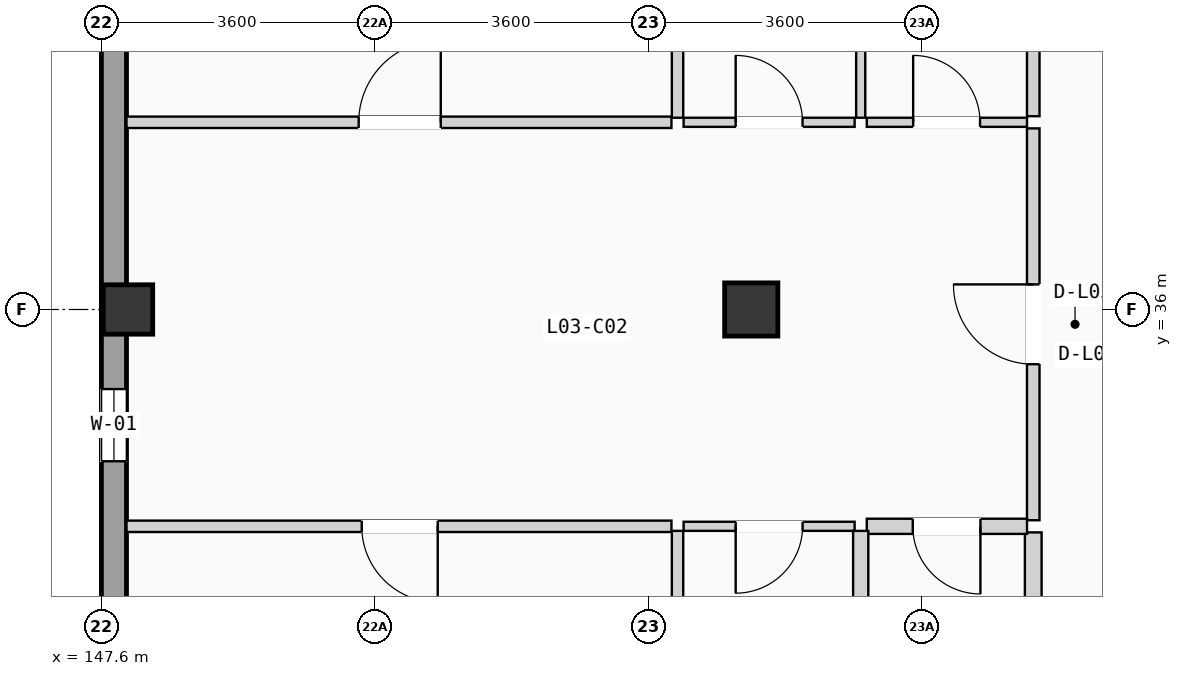
"""IFC4 building model, lengths in metres.
Left out: names, types, materials, properties, quantities, classifications, styles, units other than length and angle.
Written with IfcOpenShell. Run it as: python <this file> out.ifc"""

import sys

from ifc_helpers import new_model, si_unit, direction, frame, frame_2d, origin, origin_2d, place, context, subcontext, project, spatial, rectangle, extrude, element, fill, save


model = new_model("IFC4")
c1 = context("Model", 3, precision=1e-05, world=origin(), true_north=direction((0.0, 1.0)))
c2 = subcontext(c1, "Body", "Model", "MODEL_VIEW")
j1 = project(units=[si_unit("LENGTHUNIT", "METRE"), si_unit("PLANEANGLEUNIT", "RADIAN")], contexts=[c1])
p1 = place(None, origin())
s1 = spatial("IfcSite", under=j1, at=p1, CompositionType="ELEMENT")
p2 = place(p1, origin())
s2 = spatial("IfcBuilding", under=s1, at=p2, CompositionType="ELEMENT")
p3 = place(p2, frame((0.0, 0.0, 12.075)))
s3 = spatial("IfcBuildingStorey", under=s2, at=p3, CompositionType="ELEMENT", Elevation=12.075)
p4 = place(p3, frame((147.95, 36.0, 0.0), z_axis=(0.0, 0.0, 1.0), x_axis=(1.0, 0.0, 0.0)))
e1 = element("IfcColumn", 1, at=p4, inside=s3, PredefinedType="COLUMN", context=c2, shape_type="SweptSolid", body=[
    extrude(rectangle(XDim=0.65, YDim=0.65, at=origin_2d()), origin(), (0.0, 0.0, 1.0), 3.15),
])
p5 = place(p3, frame((156.15, 36.0, 0.0), z_axis=(0.0, 0.0, 1.0), x_axis=(1.0, 0.0, 0.0)))
e2 = element("IfcColumn", 2, at=p5, inside=s3, PredefinedType="COLUMN", context=c2, shape_type="SweptSolid", body=[
    extrude(rectangle(XDim=0.7, YDim=0.7, at=origin_2d()), origin(), (0.0, 0.0, 1.0), 3.15),
])
p6 = place(p3, frame((147.765, 0.33, 0.0), z_axis=(0.0, 0.0, 1.0), x_axis=(0.0, 1.0, 0.0)))
e3 = element("IfcWall", 3, at=p6, inside=s3, PredefinedType="SOLIDWALL", context=c2, shape_type="SweptSolid", body=[
    extrude(rectangle(XDim=49.74, YDim=0.33, at=frame_2d((24.87, 0.0))), origin(), (0.0, 0.0, 1.0), 2.89),
])
p7 = place(p6, frame((16.67, 0.0, 0.855)))
e4 = element("IfcOpeningElement", 4, at=p7, cuts=e3, PredefinedType="OPENING", context=c2, shape_type="SweptSolid", body=[
    extrude(rectangle(XDim=2.0, YDim=1.35, at=frame_2d((1.0, 0.675))), frame((0.0, 0.175, 0.0), z_axis=(0.0, -1.0, 0.0), x_axis=(1.0, 0.0, 0.0)), (0.0, 0.0, 1.0), 0.35),
])
p8 = place(p6, frame((9.535, 0.0, 0.705)))
e5 = element("IfcOpeningElement", 5, at=p8, cuts=e3, PredefinedType="OPENING", context=c2, shape_type="SweptSolid", body=[
    extrude(rectangle(XDim=2.0, YDim=1.5, at=frame_2d((1.0, 0.75))), frame((0.0, 0.175, 0.0), z_axis=(0.0, -1.0, 0.0), x_axis=(1.0, 0.0, 0.0)), (0.0, 0.0, 1.0), 0.35),
])
p9 = place(p6, frame((23.87, 0.0, 0.555)))
e6 = element("IfcOpeningElement", 6, at=p9, cuts=e3, PredefinedType="OPENING", context=c2, shape_type="SweptSolid", body=[
    extrude(rectangle(XDim=2.0, YDim=1.65, at=frame_2d((1.0, 0.825))), frame((0.0, 0.175, 0.0), z_axis=(0.0, -1.0, 0.0), x_axis=(1.0, 0.0, 0.0)), (0.0, 0.0, 1.0), 0.35),
])
p10 = place(p6, frame((33.673, 0.0, 0.85)))
e7 = element("IfcOpeningElement", 7, at=p10, cuts=e3, PredefinedType="OPENING", context=c2, shape_type="SweptSolid", body=[
    extrude(rectangle(XDim=0.95, YDim=1.2, at=frame_2d((0.475, 0.6))), frame((0.0, 0.175, 0.0), z_axis=(0.0, -1.0, 0.0), x_axis=(1.0, 0.0, 0.0)), (0.0, 0.0, 1.0), 0.35),
])
p11 = place(p6, frame((29.664, 0.0, 0.9)))
e8 = element("IfcOpeningElement", 8, at=p11, cuts=e3, PredefinedType="OPENING", context=c2, shape_type="SweptSolid", body=[
    extrude(rectangle(XDim=2.15, YDim=1.2, at=frame_2d((1.075, 0.6))), frame((0.0, 0.175, 0.0), z_axis=(0.0, -1.0, 0.0), x_axis=(1.0, 0.0, 0.0)), (0.0, 0.0, 1.0), 0.35),
])
p12 = place(p6, frame((39.266, 0.0, 0.855)))
e9 = element("IfcOpeningElement", 9, at=p12, cuts=e3, PredefinedType="OPENING", context=c2, shape_type="SweptSolid", body=[
    extrude(rectangle(XDim=2.15, YDim=1.35, at=frame_2d((1.075, 0.675))), frame((0.0, 0.175, 0.0), z_axis=(0.0, -1.0, 0.0), x_axis=(1.0, 0.0, 0.0)), (0.0, 0.0, 1.0), 0.35),
])
p13 = place(p3, frame((159.86, 33.227, 0.0), z_axis=(0.0, 0.0, 1.0), x_axis=(0.0, 1.0, 0.0)))
e10 = element("IfcWall", 10, at=p13, inside=s3, PredefinedType="PARTITIONING", context=c2, shape_type="SweptSolid", body=[
    extrude(rectangle(XDim=5.156, YDim=0.165, at=frame_2d((2.578, 0.0))), origin(), (0.0, 0.0, 1.0), 2.87),
])
p14 = place(p13, frame((2.053, 0.0, 0.0)))
e11 = element("IfcOpeningElement", 11, at=p14, cuts=e10, PredefinedType="OPENING", context=c2, shape_type="SweptSolid", body=[
    extrude(rectangle(XDim=1.05, YDim=2.13, at=frame_2d((0.525, 1.065))), frame((0.0, 0.093, 0.0), z_axis=(0.0, -1.0, 0.0), x_axis=(1.0, 0.0, 0.0)), (0.0, 0.0, 1.0), 0.185),
])
p15 = place(p3, frame((159.86, 28.81, 0.0), z_axis=(0.0, 0.0, 1.0), x_axis=(0.0, 1.0, 0.0)))
e12 = element("IfcWall", 12, at=p15, inside=s3, PredefinedType="PLUMBINGWALL", context=c2, shape_type="SweptSolid", body=[
    extrude(rectangle(XDim=4.257, YDim=0.22, at=frame_2d((2.128, 0.0))), origin(), (0.0, 0.0, 1.0), 2.87),
])
p16 = place(p3, frame((159.86, 38.543, 0.0), z_axis=(0.0, 0.0, 1.0), x_axis=(0.0, 1.0, 0.0)))
e13 = element("IfcWall", 13, at=p16, inside=s3, PredefinedType="PARTITIONING", context=c2, shape_type="SweptSolid", body=[
    extrude(rectangle(XDim=4.257, YDim=0.165, at=frame_2d((2.128, 0.0))), origin(), (0.0, 0.0, 1.0), 2.87),
])
p17 = place(p3, frame((157.67, 33.147, 0.0), z_axis=(0.0, 0.0, 1.0), x_axis=(1.0, 0.0, 0.0)))
e14 = element("IfcWall", 14, at=p17, inside=s3, PredefinedType="PLUMBINGWALL", context=c2, shape_type="SweptSolid", body=[
    extrude(rectangle(XDim=2.108, YDim=0.2, at=frame_2d((1.054, 0.0))), origin(), (0.0, 0.0, 1.0), 2.87),
])
p18 = place(p17, frame((0.605, 0.0, 0.0)))
e15 = element("IfcOpeningElement", 15, at=p18, cuts=e14, PredefinedType="OPENING", context=c2, shape_type="SweptSolid", body=[
    extrude(rectangle(XDim=0.89, YDim=2.03, at=frame_2d((0.445, 1.015))), frame((0.0, 0.11, 0.0), z_axis=(0.0, -1.0, 0.0), x_axis=(1.0, 0.0, 0.0)), (0.0, 0.0, 1.0), 0.22),
])
p19 = place(p3, frame((157.67, 38.463, 0.0), z_axis=(0.0, 0.0, 1.0), x_axis=(1.0, 0.0, 0.0)))
e16 = element("IfcWall", 16, at=p19, inside=s3, PredefinedType="PARTITIONING", context=c2, shape_type="SweptSolid", body=[
    extrude(rectangle(XDim=2.108, YDim=0.12, at=frame_2d((1.054, 0.0))), origin(), (0.0, 0.0, 1.0), 2.87),
])
p20 = place(p19, frame((0.61, 0.0, 0.0)))
e17 = element("IfcOpeningElement", 17, at=p20, cuts=e16, PredefinedType="OPENING", context=c2, shape_type="SweptSolid", body=[
    extrude(rectangle(XDim=0.88, YDim=2.02, at=frame_2d((0.44, 1.01))), frame((0.0, 0.07, 0.0), z_axis=(0.0, -1.0, 0.0), x_axis=(1.0, 0.0, 0.0)), (0.0, 0.0, 1.0), 0.14),
])
p21 = place(p3, frame((147.93, 33.147, 0.0), z_axis=(0.0, 0.0, 1.0), x_axis=(1.0, 0.0, 0.0)))
e18 = element("IfcWall", 18, at=p21, inside=s3, PredefinedType="PARTITIONING", context=c2, shape_type="SweptSolid", body=[
    extrude(rectangle(XDim=7.17, YDim=0.15, at=frame_2d((3.585, 0.0))), origin(), (0.0, 0.0, 1.0), 2.87),
])
p22 = place(p21, frame((3.095, 0.0, 0.0)))
e19 = element("IfcOpeningElement", 19, at=p22, cuts=e18, PredefinedType="OPENING", context=c2, shape_type="SweptSolid", body=[
    extrude(rectangle(XDim=1.0, YDim=2.06, at=frame_2d((0.5, 1.03))), frame((0.0, 0.085, 0.0), z_axis=(0.0, -1.0, 0.0), x_axis=(1.0, 0.0, 0.0)), (0.0, 0.0, 1.0), 0.17),
])
p23 = place(p3, frame((155.26, 33.147, 0.0), z_axis=(0.0, 0.0, 1.0), x_axis=(1.0, 0.0, 0.0)))
e20 = element("IfcWall", 20, at=p23, inside=s3, PredefinedType="PARTITIONING", context=c2, shape_type="SweptSolid", body=[
    extrude(rectangle(XDim=2.25, YDim=0.12, at=frame_2d((1.125, 0.0))), origin(), (0.0, 0.0, 1.0), 2.87),
])
p24 = place(p23, frame((0.685, 0.0, 0.0)))
e21 = element("IfcOpeningElement", 21, at=p24, cuts=e20, PredefinedType="OPENING", context=c2, shape_type="SweptSolid", body=[
    extrude(rectangle(XDim=0.88, YDim=2.02, at=frame_2d((0.44, 1.01))), frame((0.0, 0.07, 0.0), z_axis=(0.0, -1.0, 0.0), x_axis=(1.0, 0.0, 0.0)), (0.0, 0.0, 1.0), 0.14),
])
p25 = place(p3, frame((147.93, 38.463, 0.0), z_axis=(0.0, 0.0, 1.0), x_axis=(1.0, 0.0, 0.0)))
e22 = element("IfcWall", 22, at=p25, inside=s3, PredefinedType="PARTITIONING", context=c2, shape_type="SweptSolid", body=[
    extrude(rectangle(XDim=7.17, YDim=0.15, at=frame_2d((3.585, 0.0))), origin(), (0.0, 0.0, 1.0), 2.87),
])
p26 = place(p25, frame((3.055, 0.0, 0.0)))
e23 = element("IfcOpeningElement", 23, at=p26, cuts=e22, PredefinedType="OPENING", context=c2, shape_type="SweptSolid", body=[
    extrude(rectangle(XDim=1.08, YDim=2.1, at=frame_2d((0.54, 1.05))), frame((0.0, 0.085, 0.0), z_axis=(0.0, -1.0, 0.0), x_axis=(1.0, 0.0, 0.0)), (0.0, 0.0, 1.0), 0.17),
])
p27 = place(p3, frame((155.26, 38.463, 0.0), z_axis=(0.0, 0.0, 1.0), x_axis=(1.0, 0.0, 0.0)))
e24 = element("IfcWall", 24, at=p27, inside=s3, PredefinedType="PARTITIONING", context=c2, shape_type="SweptSolid", body=[
    extrude(rectangle(XDim=2.25, YDim=0.12, at=frame_2d((1.125, 0.0))), origin(), (0.0, 0.0, 1.0), 2.87),
])
p28 = place(p27, frame((0.685, 0.0, 0.0)))
e25 = element("IfcOpeningElement", 25, at=p28, cuts=e24, PredefinedType="OPENING", context=c2, shape_type="SweptSolid", body=[
    extrude(rectangle(XDim=0.88, YDim=2.02, at=frame_2d((0.44, 1.01))), frame((0.0, 0.07, 0.0), z_axis=(0.0, -1.0, 0.0), x_axis=(1.0, 0.0, 0.0)), (0.0, 0.0, 1.0), 0.14),
])
p29 = place(p3, frame((157.59, 28.81, 0.0), z_axis=(0.0, 0.0, 1.0), x_axis=(0.0, 1.0, 0.0)))
e26 = element("IfcWall", 26, at=p29, inside=s3, PredefinedType="PLUMBINGWALL", context=c2, shape_type="SweptSolid", body=[
    extrude(rectangle(XDim=4.277, YDim=0.2, at=frame_2d((2.138, 0.0))), origin(), (0.0, 0.0, 1.0), 2.87),
])
p30 = place(p29, frame((1.703, 0.0, 0.0)))
e27 = element("IfcOpeningElement", 27, at=p30, cuts=e26, PredefinedType="OPENING", context=c2, shape_type="SweptSolid", body=[
    extrude(rectangle(XDim=0.85, YDim=2.01, at=frame_2d((0.425, 1.005))), frame((0.0, 0.11, 0.0), z_axis=(0.0, -1.0, 0.0), x_axis=(1.0, 0.0, 0.0)), (0.0, 0.0, 1.0), 0.22),
])
p31 = place(p3, frame((157.59, 38.523, 0.0), z_axis=(0.0, 0.0, 1.0), x_axis=(0.0, 1.0, 0.0)))
e28 = element("IfcWall", 28, at=p31, inside=s3, PredefinedType="PARTITIONING", context=c2, shape_type="SweptSolid", body=[
    extrude(rectangle(XDim=4.277, YDim=0.12, at=frame_2d((2.139, 0.0))), origin(), (0.0, 0.0, 1.0), 2.87),
])
p32 = place(p3, frame((155.18, 28.81, 0.0), z_axis=(0.0, 0.0, 1.0), x_axis=(0.0, 1.0, 0.0)))
e29 = element("IfcWall", 29, at=p32, inside=s3, PredefinedType="PARTITIONING", context=c2, shape_type="SweptSolid", body=[
    extrude(rectangle(XDim=4.277, YDim=0.15, at=frame_2d((2.138, 0.0))), origin(), (0.0, 0.0, 1.0), 2.87),
])
p33 = place(p3, frame((155.18, 38.523, 0.0), z_axis=(0.0, 0.0, 1.0), x_axis=(0.0, 1.0, 0.0)))
e30 = element("IfcWall", 30, at=p33, inside=s3, PredefinedType="PARTITIONING", context=c2, shape_type="SweptSolid", body=[
    extrude(rectangle(XDim=4.277, YDim=0.15, at=frame_2d((2.139, 0.0))), origin(), (0.0, 0.0, 1.0), 2.87),
])
p34 = place(p10, origin())
e31 = element("IfcWindow", 31, at=p34, inside=s3, PartitioningType="SINGLE_PANEL", PredefinedType="WINDOW", context=c2, shape_type="SweptSolid", body=[
    extrude(rectangle(XDim=0.95, YDim=1.2, at=frame_2d((0.475, 0.6))), frame((0.0, 0.03, 0.0), z_axis=(0.0, -1.0, 0.0), x_axis=(1.0, 0.0, 0.0)), (0.0, 0.0, 1.0), 0.06),
])
fill(e7, e31)
p35 = place(p14, origin())
e32 = element("IfcDoor", 32, at=p35, inside=s3, OperationType="SINGLE_SWING_RIGHT", PredefinedType="DOOR", context=c2, shape_type="SweptSolid", body=[
    extrude(rectangle(XDim=1.05, YDim=2.13, at=frame_2d((0.525, 1.065))), frame((0.0, 0.025, 0.0), z_axis=(0.0, -1.0, 0.0), x_axis=(1.0, 0.0, 0.0)), (0.0, 0.0, 1.0), 0.05),
])
fill(e11, e32)
p36 = place(p18, frame((0.89, 0.0, 0.0), z_axis=(0.0, 0.0, 1.0), x_axis=(-1.0, 0.0, 0.0)))
e33 = element("IfcDoor", 33, at=p36, inside=s3, OperationType="SINGLE_SWING_RIGHT", PredefinedType="DOOR", context=c2, shape_type="SweptSolid", body=[
    extrude(rectangle(XDim=0.89, YDim=2.03, at=frame_2d((0.445, 1.015))), frame((0.0, 0.025, 0.0), z_axis=(0.0, -1.0, 0.0), x_axis=(1.0, 0.0, 0.0)), (0.0, 0.0, 1.0), 0.05),
])
fill(e15, e33)
p37 = place(p20, origin())
e34 = element("IfcDoor", 34, at=p37, inside=s3, OperationType="SINGLE_SWING_LEFT", PredefinedType="DOOR", context=c2, shape_type="SweptSolid", body=[
    extrude(rectangle(XDim=0.88, YDim=2.02, at=frame_2d((0.44, 1.01))), frame((0.0, 0.025, 0.0), z_axis=(0.0, -1.0, 0.0), x_axis=(1.0, 0.0, 0.0)), (0.0, 0.0, 1.0), 0.05),
])
fill(e17, e34)
p38 = place(p22, frame((1.0, 0.0, 0.0), z_axis=(0.0, 0.0, 1.0), x_axis=(-1.0, 0.0, 0.0)))
e35 = element("IfcDoor", 35, at=p38, inside=s3, OperationType="SINGLE_SWING_RIGHT", PredefinedType="DOOR", context=c2, shape_type="SweptSolid", body=[
    extrude(rectangle(XDim=1.0, YDim=2.06, at=frame_2d((0.5, 1.03))), frame((0.0, 0.025, 0.0), z_axis=(0.0, -1.0, 0.0), x_axis=(1.0, 0.0, 0.0)), (0.0, 0.0, 1.0), 0.05),
])
fill(e19, e35)
p39 = place(p24, frame((0.88, 0.0, 0.0), z_axis=(0.0, 0.0, 1.0), x_axis=(-1.0, 0.0, 0.0)))
e36 = element("IfcDoor", 36, at=p39, inside=s3, OperationType="SINGLE_SWING_LEFT", PredefinedType="DOOR", context=c2, shape_type="SweptSolid", body=[
    extrude(rectangle(XDim=0.88, YDim=2.02, at=frame_2d((0.44, 1.01))), frame((0.0, 0.025, 0.0), z_axis=(0.0, -1.0, 0.0), x_axis=(1.0, 0.0, 0.0)), (0.0, 0.0, 1.0), 0.05),
])
fill(e21, e36)
p40 = place(p26, origin())
e37 = element("IfcDoor", 37, at=p40, inside=s3, OperationType="SINGLE_SWING_RIGHT", PredefinedType="DOOR", context=c2, shape_type="SweptSolid", body=[
    extrude(rectangle(XDim=1.08, YDim=2.1, at=frame_2d((0.54, 1.05))), frame((0.0, 0.025, 0.0), z_axis=(0.0, -1.0, 0.0), x_axis=(1.0, 0.0, 0.0)), (0.0, 0.0, 1.0), 0.05),
])
fill(e23, e37)
p41 = place(p28, origin())
e38 = element("IfcDoor", 38, at=p41, inside=s3, OperationType="SINGLE_SWING_LEFT", PredefinedType="DOOR", context=c2, shape_type="SweptSolid", body=[
    extrude(rectangle(XDim=0.88, YDim=2.02, at=frame_2d((0.44, 1.01))), frame((0.0, 0.025, 0.0), z_axis=(0.0, -1.0, 0.0), x_axis=(1.0, 0.0, 0.0)), (0.0, 0.0, 1.0), 0.05),
])
fill(e25, e38)
save(model, sys.argv[1])
